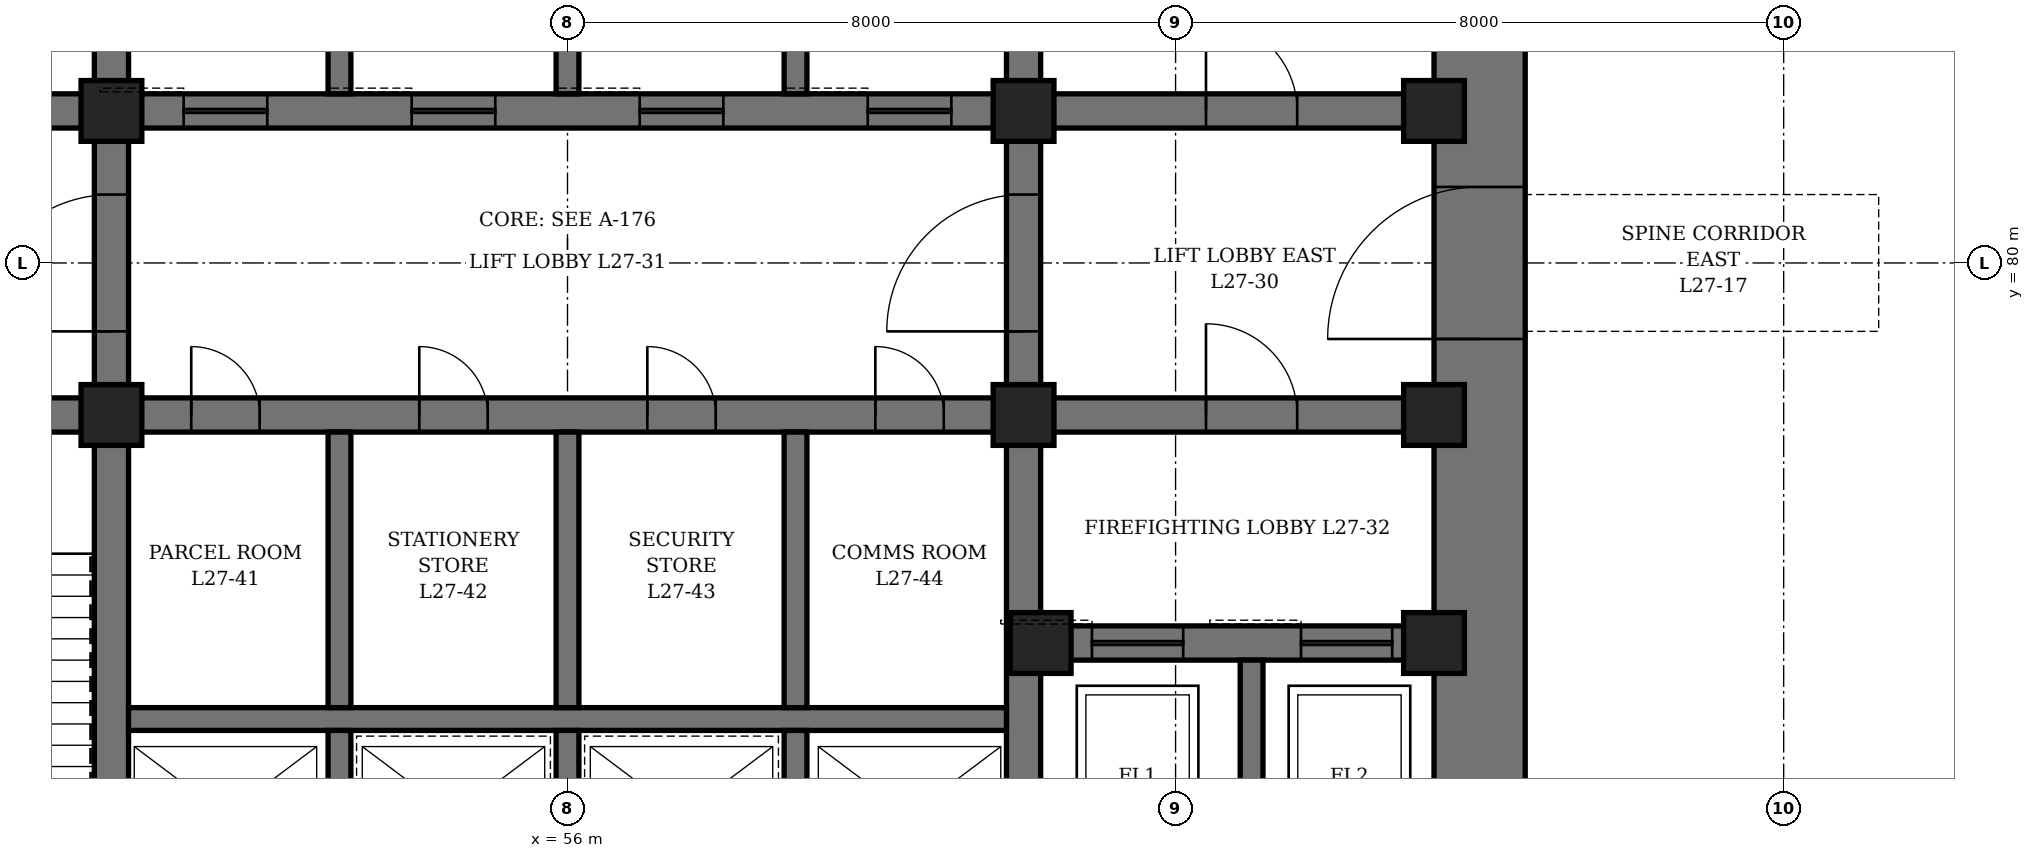
"""IFC4 building model, lengths in metres.
Left out: names, types, materials, properties, quantities, classifications, styles, units other than length and angle.
Written with IfcOpenShell. Run it as: python <this file> out.ifc"""

import sys

from ifc_helpers import new_model, si_unit, direction, frame, frame_2d, origin, origin_2d, place, context, subcontext, project, spatial, rectangle, hollow_rectangle, extrude, element, fill, save


model = new_model("IFC4")
c1 = context("Model", 3, precision=1e-05, world=origin(), true_north=direction((0.0, 1.0)))
c2 = subcontext(c1, "Body", "Model", "MODEL_VIEW")
j1 = project(units=[si_unit("LENGTHUNIT", "METRE"), si_unit("PLANEANGLEUNIT", "RADIAN")], contexts=[c1])
p1 = place(None, origin())
s1 = spatial("IfcSite", under=j1, at=p1, CompositionType="ELEMENT")
p2 = place(p1, origin())
s2 = spatial("IfcBuilding", under=s1, at=p2, CompositionType="ELEMENT")
p3 = place(p2, frame((0.0, 0.0, 124.9)))
s3 = spatial("IfcBuildingStorey", under=s2, at=p3, CompositionType="ELEMENT", Elevation=124.9)
p4 = place(p3, frame((68.0, 70.4, 0.0), z_axis=(0.0, 0.0, 1.0), x_axis=(0.0, 1.0, 0.0)))
e1 = element("IfcWall", 1, at=p4, inside=s3, PredefinedType="SHEAR", context=c2, shape_type="SweptSolid", body=[
    extrude(rectangle(XDim=19.2, YDim=1.2, at=frame_2d((9.6, 0.0))), origin(), (0.0, 0.0, 1.0), 4.2),
])
p5 = place(p4, frame((8.6, 0.0, 0.0)))
e2 = element("IfcOpeningElement", 2, at=p5, cuts=e1, PredefinedType="OPENING", context=c2, shape_type="SweptSolid", body=[
    extrude(rectangle(XDim=2.0, YDim=2.4, at=frame_2d((1.0, 1.2))), frame((0.0, 0.61, 0.0), z_axis=(0.0, -1.0, 0.0), x_axis=(1.0, 0.0, 0.0)), (0.0, 0.0, 1.0), 1.22),
])
p6 = place(p3, frame((50.0, 71.6, 0.0), z_axis=(0.0, 0.0, 1.0), x_axis=(0.0, 1.0, 0.0)))
e3 = element("IfcWall", 3, at=p6, inside=s3, PredefinedType="SHEAR", context=c2, shape_type="SweptSolid", body=[
    extrude(rectangle(XDim=16.8, YDim=0.45, at=frame_2d((8.4, 0.0))), origin(), (0.0, 0.0, 1.0), 4.2),
])
p7 = place(p6, frame((7.5, 0.0, 0.0)))
e4 = element("IfcOpeningElement", 4, at=p7, cuts=e3, PredefinedType="OPENING", context=c2, shape_type="SweptSolid", body=[
    extrude(rectangle(XDim=1.8, YDim=2.4, at=frame_2d((0.9, 1.2))), frame((0.0, 0.235, 0.0), z_axis=(0.0, -1.0, 0.0), x_axis=(1.0, 0.0, 0.0)), (0.0, 0.0, 1.0), 0.47),
])
p8 = place(p3, frame((62.0, 71.6, 0.0), z_axis=(0.0, 0.0, 1.0), x_axis=(0.0, 1.0, 0.0)))
e5 = element("IfcWall", 5, at=p8, inside=s3, PredefinedType="SHEAR", context=c2, shape_type="SweptSolid", body=[
    extrude(rectangle(XDim=16.8, YDim=0.45, at=frame_2d((8.4, 0.0))), origin(), (0.0, 0.0, 1.0), 4.2),
])
p9 = place(p8, frame((7.5, 0.0, 0.0)))
e6 = element("IfcOpeningElement", 6, at=p9, cuts=e5, PredefinedType="OPENING", context=c2, shape_type="SweptSolid", body=[
    extrude(rectangle(XDim=1.8, YDim=2.4, at=frame_2d((0.9, 1.2))), frame((0.0, 0.235, 0.0), z_axis=(0.0, -1.0, 0.0), x_axis=(1.0, 0.0, 0.0)), (0.0, 0.0, 1.0), 0.47),
])
p10 = place(p3, frame((44.6, 78.0, 0.0), z_axis=(0.0, 0.0, 1.0), x_axis=(1.0, 0.0, 0.0)))
e7 = element("IfcWall", 7, at=p10, inside=s3, PredefinedType="SHEAR", context=c2, shape_type="SweptSolid", body=[
    extrude(rectangle(XDim=5.175, YDim=0.45, at=frame_2d((2.587, 0.0))), origin(), (0.0, 0.0, 1.0), 4.2),
])
p11 = place(p10, frame((1.8, 0.0, 0.0)))
e8 = element("IfcOpeningElement", 8, at=p11, cuts=e7, PredefinedType="OPENING", context=c2, shape_type="SweptSolid", body=[
    extrude(rectangle(XDim=1.2, YDim=2.1, at=frame_2d((0.6, 1.05))), frame((0.0, 0.235, 0.0), z_axis=(0.0, -1.0, 0.0), x_axis=(1.0, 0.0, 0.0)), (0.0, 0.0, 1.0), 0.47),
])
p12 = place(p3, frame((44.6, 82.0, 0.0), z_axis=(0.0, 0.0, 1.0), x_axis=(1.0, 0.0, 0.0)))
e9 = element("IfcWall", 9, at=p12, inside=s3, PredefinedType="SHEAR", context=c2, shape_type="SweptSolid", body=[
    extrude(rectangle(XDim=5.175, YDim=0.45, at=frame_2d((2.587, 0.0))), origin(), (0.0, 0.0, 1.0), 4.2),
])
p13 = place(p12, frame((0.7, 0.0, 0.0)))
e10 = element("IfcOpeningElement", 10, at=p13, cuts=e9, PredefinedType="OPENING", context=c2, shape_type="SweptSolid", body=[
    extrude(rectangle(XDim=0.9, YDim=2.1, at=frame_2d((0.45, 1.05))), frame((0.0, 0.235, 0.0), z_axis=(0.0, -1.0, 0.0), x_axis=(1.0, 0.0, 0.0)), (0.0, 0.0, 1.0), 0.47),
])
p14 = place(p3, frame((62.225, 75.0, 0.0), z_axis=(0.0, 0.0, 1.0), x_axis=(1.0, 0.0, 0.0)))
e11 = element("IfcWall", 11, at=p14, inside=s3, PredefinedType="SHEAR", context=c2, shape_type="SweptSolid", body=[
    extrude(rectangle(XDim=5.175, YDim=0.45, at=frame_2d((2.587, 0.0))), origin(), (0.0, 0.0, 1.0), 4.2),
])
p15 = place(p14, frame((0.675, 0.0, 0.0)))
e12 = element("IfcOpeningElement", 12, at=p15, cuts=e11, PredefinedType="OPENING", context=c2, shape_type="SweptSolid", body=[
    extrude(rectangle(XDim=1.2, YDim=2.2, at=frame_2d((0.6, 1.1))), frame((0.0, 0.235, 0.0), z_axis=(0.0, -1.0, 0.0), x_axis=(1.0, 0.0, 0.0)), (0.0, 0.0, 1.0), 0.47),
])
p16 = place(p14, frame((3.425, 0.0, 0.0)))
e13 = element("IfcOpeningElement", 13, at=p16, cuts=e11, PredefinedType="OPENING", context=c2, shape_type="SweptSolid", body=[
    extrude(rectangle(XDim=1.2, YDim=2.2, at=frame_2d((0.6, 1.1))), frame((0.0, 0.235, 0.0), z_axis=(0.0, -1.0, 0.0), x_axis=(1.0, 0.0, 0.0)), (0.0, 0.0, 1.0), 0.47),
])
p17 = place(p3, frame((62.225, 78.0, 0.0), z_axis=(0.0, 0.0, 1.0), x_axis=(1.0, 0.0, 0.0)))
e14 = element("IfcWall", 14, at=p17, inside=s3, PredefinedType="SHEAR", context=c2, shape_type="SweptSolid", body=[
    extrude(rectangle(XDim=5.175, YDim=0.45, at=frame_2d((2.587, 0.0))), origin(), (0.0, 0.0, 1.0), 4.2),
])
p18 = place(p17, frame((2.175, 0.0, 0.0)))
e15 = element("IfcOpeningElement", 15, at=p18, cuts=e14, PredefinedType="OPENING", context=c2, shape_type="SweptSolid", body=[
    extrude(rectangle(XDim=1.2, YDim=2.1, at=frame_2d((0.6, 1.05))), frame((0.0, 0.235, 0.0), z_axis=(0.0, -1.0, 0.0), x_axis=(1.0, 0.0, 0.0)), (0.0, 0.0, 1.0), 0.47),
])
p19 = place(p3, frame((62.225, 82.0, 0.0), z_axis=(0.0, 0.0, 1.0), x_axis=(1.0, 0.0, 0.0)))
e16 = element("IfcWall", 16, at=p19, inside=s3, PredefinedType="SHEAR", context=c2, shape_type="SweptSolid", body=[
    extrude(rectangle(XDim=5.175, YDim=0.45, at=frame_2d((2.587, 0.0))), origin(), (0.0, 0.0, 1.0), 4.2),
])
p20 = place(p19, frame((2.175, 0.0, 0.0)))
e17 = element("IfcOpeningElement", 17, at=p20, cuts=e16, PredefinedType="OPENING", context=c2, shape_type="SweptSolid", body=[
    extrude(rectangle(XDim=1.2, YDim=2.1, at=frame_2d((0.6, 1.05))), frame((0.0, 0.235, 0.0), z_axis=(0.0, -1.0, 0.0), x_axis=(1.0, 0.0, 0.0)), (0.0, 0.0, 1.0), 0.47),
])
p21 = place(p3, frame((50.225, 78.0, 0.0), z_axis=(0.0, 0.0, 1.0), x_axis=(1.0, 0.0, 0.0)))
e18 = element("IfcWall", 18, at=p21, inside=s3, PredefinedType="SHEAR", context=c2, shape_type="SweptSolid", body=[
    extrude(rectangle(XDim=11.55, YDim=0.45, at=frame_2d((5.775, 0.0))), origin(), (0.0, 0.0, 1.0), 4.2),
])
p22 = place(p21, frame((0.825, 0.0, 0.0)))
e19 = element("IfcOpeningElement", 19, at=p22, cuts=e18, PredefinedType="OPENING", context=c2, shape_type="SweptSolid", body=[
    extrude(rectangle(XDim=0.9, YDim=2.1, at=frame_2d((0.45, 1.05))), frame((0.0, 0.235, 0.0), z_axis=(0.0, -1.0, 0.0), x_axis=(1.0, 0.0, 0.0)), (0.0, 0.0, 1.0), 0.47),
])
p23 = place(p21, frame((3.825, 0.0, 0.0)))
e20 = element("IfcOpeningElement", 20, at=p23, cuts=e18, PredefinedType="OPENING", context=c2, shape_type="SweptSolid", body=[
    extrude(rectangle(XDim=0.9, YDim=2.1, at=frame_2d((0.45, 1.05))), frame((0.0, 0.235, 0.0), z_axis=(0.0, -1.0, 0.0), x_axis=(1.0, 0.0, 0.0)), (0.0, 0.0, 1.0), 0.47),
])
p24 = place(p21, frame((6.825, 0.0, 0.0)))
e21 = element("IfcOpeningElement", 21, at=p24, cuts=e18, PredefinedType="OPENING", context=c2, shape_type="SweptSolid", body=[
    extrude(rectangle(XDim=0.9, YDim=2.1, at=frame_2d((0.45, 1.05))), frame((0.0, 0.235, 0.0), z_axis=(0.0, -1.0, 0.0), x_axis=(1.0, 0.0, 0.0)), (0.0, 0.0, 1.0), 0.47),
])
p25 = place(p21, frame((9.825, 0.0, 0.0)))
e22 = element("IfcOpeningElement", 22, at=p25, cuts=e18, PredefinedType="OPENING", context=c2, shape_type="SweptSolid", body=[
    extrude(rectangle(XDim=0.9, YDim=2.1, at=frame_2d((0.45, 1.05))), frame((0.0, 0.235, 0.0), z_axis=(0.0, -1.0, 0.0), x_axis=(1.0, 0.0, 0.0)), (0.0, 0.0, 1.0), 0.47),
])
p26 = place(p3, frame((50.225, 82.0, 0.0), z_axis=(0.0, 0.0, 1.0), x_axis=(1.0, 0.0, 0.0)))
e23 = element("IfcWall", 23, at=p26, inside=s3, PredefinedType="SHEAR", context=c2, shape_type="SweptSolid", body=[
    extrude(rectangle(XDim=11.55, YDim=0.45, at=frame_2d((5.775, 0.0))), origin(), (0.0, 0.0, 1.0), 4.2),
])
p27 = place(p26, frame((0.725, 0.0, 0.0)))
e24 = element("IfcOpeningElement", 24, at=p27, cuts=e23, PredefinedType="OPENING", context=c2, shape_type="SweptSolid", body=[
    extrude(rectangle(XDim=1.1, YDim=2.2, at=frame_2d((0.55, 1.1))), frame((0.0, 0.235, 0.0), z_axis=(0.0, -1.0, 0.0), x_axis=(1.0, 0.0, 0.0)), (0.0, 0.0, 1.0), 0.47),
])
p28 = place(p26, frame((3.725, 0.0, 0.0)))
e25 = element("IfcOpeningElement", 25, at=p28, cuts=e23, PredefinedType="OPENING", context=c2, shape_type="SweptSolid", body=[
    extrude(rectangle(XDim=1.1, YDim=2.2, at=frame_2d((0.55, 1.1))), frame((0.0, 0.235, 0.0), z_axis=(0.0, -1.0, 0.0), x_axis=(1.0, 0.0, 0.0)), (0.0, 0.0, 1.0), 0.47),
])
p29 = place(p26, frame((6.725, 0.0, 0.0)))
e26 = element("IfcOpeningElement", 26, at=p29, cuts=e23, PredefinedType="OPENING", context=c2, shape_type="SweptSolid", body=[
    extrude(rectangle(XDim=1.1, YDim=2.2, at=frame_2d((0.55, 1.1))), frame((0.0, 0.235, 0.0), z_axis=(0.0, -1.0, 0.0), x_axis=(1.0, 0.0, 0.0)), (0.0, 0.0, 1.0), 0.47),
])
p30 = place(p26, frame((9.725, 0.0, 0.0)))
e27 = element("IfcOpeningElement", 27, at=p30, cuts=e23, PredefinedType="OPENING", context=c2, shape_type="SweptSolid", body=[
    extrude(rectangle(XDim=1.1, YDim=2.2, at=frame_2d((0.55, 1.1))), frame((0.0, 0.235, 0.0), z_axis=(0.0, -1.0, 0.0), x_axis=(1.0, 0.0, 0.0)), (0.0, 0.0, 1.0), 0.47),
])
p31 = place(p3, frame((50.225, 74.0, 0.0), z_axis=(0.0, 0.0, 1.0), x_axis=(1.0, 0.0, 0.0)))
e28 = element("IfcWall", 28, at=p31, inside=s3, PredefinedType="SHEAR", context=c2, shape_type="SweptSolid", body=[
    extrude(rectangle(XDim=11.55, YDim=0.3, at=frame_2d((5.775, 0.0))), origin(), (0.0, 0.0, 1.0), 4.2),
])
p32 = place(p3, frame((53.0, 71.6, 0.0), z_axis=(0.0, 0.0, 1.0), x_axis=(0.0, 1.0, 0.0)))
e29 = element("IfcWall", 29, at=p32, inside=s3, PredefinedType="SHEAR", context=c2, shape_type="SweptSolid", body=[
    extrude(rectangle(XDim=2.25, YDim=0.3, at=frame_2d((1.125, 0.0))), origin(), (0.0, 0.0, 1.0), 4.2),
])
p33 = place(p3, frame((53.0, 74.15, 0.0), z_axis=(0.0, 0.0, 1.0), x_axis=(0.0, 1.0, 0.0)))
e30 = element("IfcWall", 30, at=p33, inside=s3, PredefinedType="SHEAR", context=c2, shape_type="SweptSolid", body=[
    extrude(rectangle(XDim=3.625, YDim=0.3, at=frame_2d((1.812, 0.0))), origin(), (0.0, 0.0, 1.0), 4.2),
])
p34 = place(p3, frame((53.0, 82.225, 0.0), z_axis=(0.0, 0.0, 1.0), x_axis=(0.0, 1.0, 0.0)))
e31 = element("IfcWall", 31, at=p34, inside=s3, PredefinedType="SHEAR", context=c2, shape_type="SweptSolid", body=[
    extrude(rectangle(XDim=3.55, YDim=0.3, at=frame_2d((1.775, 0.0))), origin(), (0.0, 0.0, 1.0), 4.2),
])
p35 = place(p3, frame((56.0, 71.6, 0.0), z_axis=(0.0, 0.0, 1.0), x_axis=(0.0, 1.0, 0.0)))
e32 = element("IfcWall", 32, at=p35, inside=s3, PredefinedType="SHEAR", context=c2, shape_type="SweptSolid", body=[
    extrude(rectangle(XDim=2.25, YDim=0.3, at=frame_2d((1.125, 0.0))), origin(), (0.0, 0.0, 1.0), 4.2),
])
p36 = place(p3, frame((56.0, 74.15, 0.0), z_axis=(0.0, 0.0, 1.0), x_axis=(0.0, 1.0, 0.0)))
e33 = element("IfcWall", 33, at=p36, inside=s3, PredefinedType="SHEAR", context=c2, shape_type="SweptSolid", body=[
    extrude(rectangle(XDim=3.625, YDim=0.3, at=frame_2d((1.812, 0.0))), origin(), (0.0, 0.0, 1.0), 4.2),
])
p37 = place(p3, frame((56.0, 82.225, 0.0), z_axis=(0.0, 0.0, 1.0), x_axis=(0.0, 1.0, 0.0)))
e34 = element("IfcWall", 34, at=p37, inside=s3, PredefinedType="SHEAR", context=c2, shape_type="SweptSolid", body=[
    extrude(rectangle(XDim=3.55, YDim=0.3, at=frame_2d((1.775, 0.0))), origin(), (0.0, 0.0, 1.0), 4.2),
])
p38 = place(p3, frame((59.0, 71.6, 0.0), z_axis=(0.0, 0.0, 1.0), x_axis=(0.0, 1.0, 0.0)))
e35 = element("IfcWall", 35, at=p38, inside=s3, PredefinedType="SHEAR", context=c2, shape_type="SweptSolid", body=[
    extrude(rectangle(XDim=2.25, YDim=0.3, at=frame_2d((1.125, 0.0))), origin(), (0.0, 0.0, 1.0), 4.2),
])
p39 = place(p3, frame((59.0, 74.15, 0.0), z_axis=(0.0, 0.0, 1.0), x_axis=(0.0, 1.0, 0.0)))
e36 = element("IfcWall", 36, at=p39, inside=s3, PredefinedType="SHEAR", context=c2, shape_type="SweptSolid", body=[
    extrude(rectangle(XDim=3.625, YDim=0.3, at=frame_2d((1.812, 0.0))), origin(), (0.0, 0.0, 1.0), 4.2),
])
p40 = place(p3, frame((59.0, 82.225, 0.0), z_axis=(0.0, 0.0, 1.0), x_axis=(0.0, 1.0, 0.0)))
e37 = element("IfcWall", 37, at=p40, inside=s3, PredefinedType="SHEAR", context=c2, shape_type="SweptSolid", body=[
    extrude(rectangle(XDim=3.55, YDim=0.3, at=frame_2d((1.775, 0.0))), origin(), (0.0, 0.0, 1.0), 4.2),
])
p41 = place(p3, frame((65.0, 71.6, 0.0), z_axis=(0.0, 0.0, 1.0), x_axis=(0.0, 1.0, 0.0)))
e38 = element("IfcWall", 38, at=p41, inside=s3, PredefinedType="SHEAR", context=c2, shape_type="SweptSolid", body=[
    extrude(rectangle(XDim=3.175, YDim=0.3, at=frame_2d((1.587, 0.0))), origin(), (0.0, 0.0, 1.0), 4.2),
])
for number, where, z_axis, x_axis in (
    (39, (50.0, 78.0, 0.0), (0.0, 0.0, 1.0), (1.0, 0.0, 0.0)),
    (40, (50.0, 82.0, 0.0), (0.0, 0.0, 1.0), (1.0, 0.0, 0.0)),
    (41, (62.0, 78.0, 0.0), (0.0, 0.0, 1.0), (1.0, 0.0, 0.0)),
    (42, (62.0, 82.0, 0.0), (0.0, 0.0, 1.0), (1.0, 0.0, 0.0)),
    (43, (62.225, 75.0, 0.0), (0.0, 0.0, 1.0), (1.0, 0.0, 0.0)),
    (44, (67.4, 75.0, 0.0), (0.0, 0.0, 1.0), (1.0, 0.0, 0.0)),
    (45, (67.4, 78.0, 0.0), (0.0, 0.0, 1.0), (1.0, 0.0, 0.0)),
    (46, (67.4, 82.0, 0.0), (0.0, 0.0, 1.0), (1.0, 0.0, 0.0)),
):
    element("IfcColumn", number, at=place(p3, frame(where, z_axis=z_axis, x_axis=x_axis)), inside=s3, PredefinedType="COLUMN", context=c2, shape_type="SweptSolid", body=[
        extrude(hollow_rectangle(XDim=0.8, YDim=0.8, WallThickness=0.1, at=origin_2d()), origin(), (0.0, 0.0, 1.0), 4.2),
    ])
p42 = place(p22, origin())
e47 = element("IfcDoor", 47, at=p42, inside=s3, OperationType="SINGLE_SWING_LEFT", PredefinedType="DOOR", context=c2, shape_type="SweptSolid", body=[
    extrude(rectangle(XDim=0.9, YDim=2.1, at=frame_2d((0.45, 1.05))), frame((0.0, 0.225, 0.0), z_axis=(0.0, -1.0, 0.0), x_axis=(1.0, 0.0, 0.0)), (0.0, 0.0, 1.0), 0.449),
])
fill(e19, e47)
p43 = place(p23, origin())
e48 = element("IfcDoor", 48, at=p43, inside=s3, OperationType="SINGLE_SWING_LEFT", PredefinedType="DOOR", context=c2, shape_type="SweptSolid", body=[
    extrude(rectangle(XDim=0.9, YDim=2.1, at=frame_2d((0.45, 1.05))), frame((0.0, 0.225, 0.0), z_axis=(0.0, -1.0, 0.0), x_axis=(1.0, 0.0, 0.0)), (0.0, 0.0, 1.0), 0.449),
])
fill(e20, e48)
p44 = place(p24, origin())
e49 = element("IfcDoor", 49, at=p44, inside=s3, OperationType="SINGLE_SWING_LEFT", PredefinedType="DOOR", context=c2, shape_type="SweptSolid", body=[
    extrude(rectangle(XDim=0.9, YDim=2.1, at=frame_2d((0.45, 1.05))), frame((0.0, 0.225, 0.0), z_axis=(0.0, -1.0, 0.0), x_axis=(1.0, 0.0, 0.0)), (0.0, 0.0, 1.0), 0.449),
])
fill(e21, e49)
p45 = place(p25, origin())
e50 = element("IfcDoor", 50, at=p45, inside=s3, OperationType="SINGLE_SWING_LEFT", PredefinedType="DOOR", context=c2, shape_type="SweptSolid", body=[
    extrude(rectangle(XDim=0.9, YDim=2.1, at=frame_2d((0.45, 1.05))), frame((0.0, 0.225, 0.0), z_axis=(0.0, -1.0, 0.0), x_axis=(1.0, 0.0, 0.0)), (0.0, 0.0, 1.0), 0.449),
])
fill(e22, e50)
p46 = place(p20, origin())
e51 = element("IfcDoor", 51, at=p46, inside=s3, OperationType="SINGLE_SWING_LEFT", PredefinedType="DOOR", context=c2, shape_type="SweptSolid", body=[
    extrude(rectangle(XDim=1.2, YDim=2.1, at=frame_2d((0.6, 1.05))), frame((0.0, 0.225, 0.0), z_axis=(0.0, -1.0, 0.0), x_axis=(1.0, 0.0, 0.0)), (0.0, 0.0, 1.0), 0.449),
])
fill(e17, e51)
p47 = place(p5, origin())
e52 = element("IfcDoor", 52, at=p47, inside=s3, OperationType="DOUBLE_DOOR_SINGLE_SWING", PredefinedType="DOOR", context=c2, shape_type="SweptSolid", body=[
    extrude(rectangle(XDim=2.0, YDim=2.4, at=frame_2d((1.0, 1.2))), frame((0.0, 0.35, 0.0), z_axis=(0.0, -1.0, 0.0), x_axis=(1.0, 0.0, 0.0)), (0.0, 0.0, 1.0), 0.7),
])
fill(e2, e52)
p48 = place(p7, origin())
e53 = element("IfcDoor", 53, at=p48, inside=s3, OperationType="DOUBLE_DOOR_SINGLE_SWING", PredefinedType="DOOR", context=c2, shape_type="SweptSolid", body=[
    extrude(rectangle(XDim=1.8, YDim=2.4, at=frame_2d((0.9, 1.2))), frame((0.0, 0.225, 0.0), z_axis=(0.0, -1.0, 0.0), x_axis=(1.0, 0.0, 0.0)), (0.0, 0.0, 1.0), 0.449),
])
fill(e4, e53)
p49 = place(p9, origin())
e54 = element("IfcDoor", 54, at=p49, inside=s3, OperationType="DOUBLE_DOOR_SINGLE_SWING", PredefinedType="DOOR", context=c2, shape_type="SweptSolid", body=[
    extrude(rectangle(XDim=1.8, YDim=2.4, at=frame_2d((0.9, 1.2))), frame((0.0, 0.225, 0.0), z_axis=(0.0, -1.0, 0.0), x_axis=(1.0, 0.0, 0.0)), (0.0, 0.0, 1.0), 0.449),
])
fill(e6, e54)
p50 = place(p18, origin())
e55 = element("IfcDoor", 55, at=p50, inside=s3, OperationType="SINGLE_SWING_RIGHT", PredefinedType="DOOR", context=c2, shape_type="SweptSolid", body=[
    extrude(rectangle(XDim=1.2, YDim=2.1, at=frame_2d((0.6, 1.05))), frame((0.0, 0.225, 0.0), z_axis=(0.0, -1.0, 0.0), x_axis=(1.0, 0.0, 0.0)), (0.0, 0.0, 1.0), 0.449),
])
fill(e15, e55)
p51 = place(p27, origin())
e56 = element("IfcDoor", 56, at=p51, inside=s3, OperationType="SLIDING_TO_LEFT", PredefinedType="DOOR", context=c2, shape_type="SweptSolid", body=[
    extrude(rectangle(XDim=1.1, YDim=2.2, at=frame_2d((0.55, 1.1))), frame((0.0, 0.225, 0.0), z_axis=(0.0, -1.0, 0.0), x_axis=(1.0, 0.0, 0.0)), (0.0, 0.0, 1.0), 0.449),
])
fill(e24, e56)
p52 = place(p28, origin())
e57 = element("IfcDoor", 57, at=p52, inside=s3, OperationType="SLIDING_TO_LEFT", PredefinedType="DOOR", context=c2, shape_type="SweptSolid", body=[
    extrude(rectangle(XDim=1.1, YDim=2.2, at=frame_2d((0.55, 1.1))), frame((0.0, 0.225, 0.0), z_axis=(0.0, -1.0, 0.0), x_axis=(1.0, 0.0, 0.0)), (0.0, 0.0, 1.0), 0.449),
])
fill(e25, e57)
p53 = place(p29, origin())
e58 = element("IfcDoor", 58, at=p53, inside=s3, OperationType="SLIDING_TO_LEFT", PredefinedType="DOOR", context=c2, shape_type="SweptSolid", body=[
    extrude(rectangle(XDim=1.1, YDim=2.2, at=frame_2d((0.55, 1.1))), frame((0.0, 0.225, 0.0), z_axis=(0.0, -1.0, 0.0), x_axis=(1.0, 0.0, 0.0)), (0.0, 0.0, 1.0), 0.449),
])
fill(e26, e58)
p54 = place(p30, origin())
e59 = element("IfcDoor", 59, at=p54, inside=s3, OperationType="SLIDING_TO_LEFT", PredefinedType="DOOR", context=c2, shape_type="SweptSolid", body=[
    extrude(rectangle(XDim=1.1, YDim=2.2, at=frame_2d((0.55, 1.1))), frame((0.0, 0.225, 0.0), z_axis=(0.0, -1.0, 0.0), x_axis=(1.0, 0.0, 0.0)), (0.0, 0.0, 1.0), 0.449),
])
fill(e27, e59)
p55 = place(p15, origin())
e60 = element("IfcDoor", 60, at=p55, inside=s3, OperationType="SLIDING_TO_LEFT", PredefinedType="DOOR", context=c2, shape_type="SweptSolid", body=[
    extrude(rectangle(XDim=1.2, YDim=2.2, at=frame_2d((0.6, 1.1))), frame((0.0, 0.225, 0.0), z_axis=(0.0, -1.0, 0.0), x_axis=(1.0, 0.0, 0.0)), (0.0, 0.0, 1.0), 0.449),
])
fill(e12, e60)
p56 = place(p16, origin())
e61 = element("IfcDoor", 61, at=p56, inside=s3, OperationType="SLIDING_TO_LEFT", PredefinedType="DOOR", context=c2, shape_type="SweptSolid", body=[
    extrude(rectangle(XDim=1.2, YDim=2.2, at=frame_2d((0.6, 1.1))), frame((0.0, 0.225, 0.0), z_axis=(0.0, -1.0, 0.0), x_axis=(1.0, 0.0, 0.0)), (0.0, 0.0, 1.0), 0.449),
])
fill(e13, e61)
save(model, sys.argv[1])
